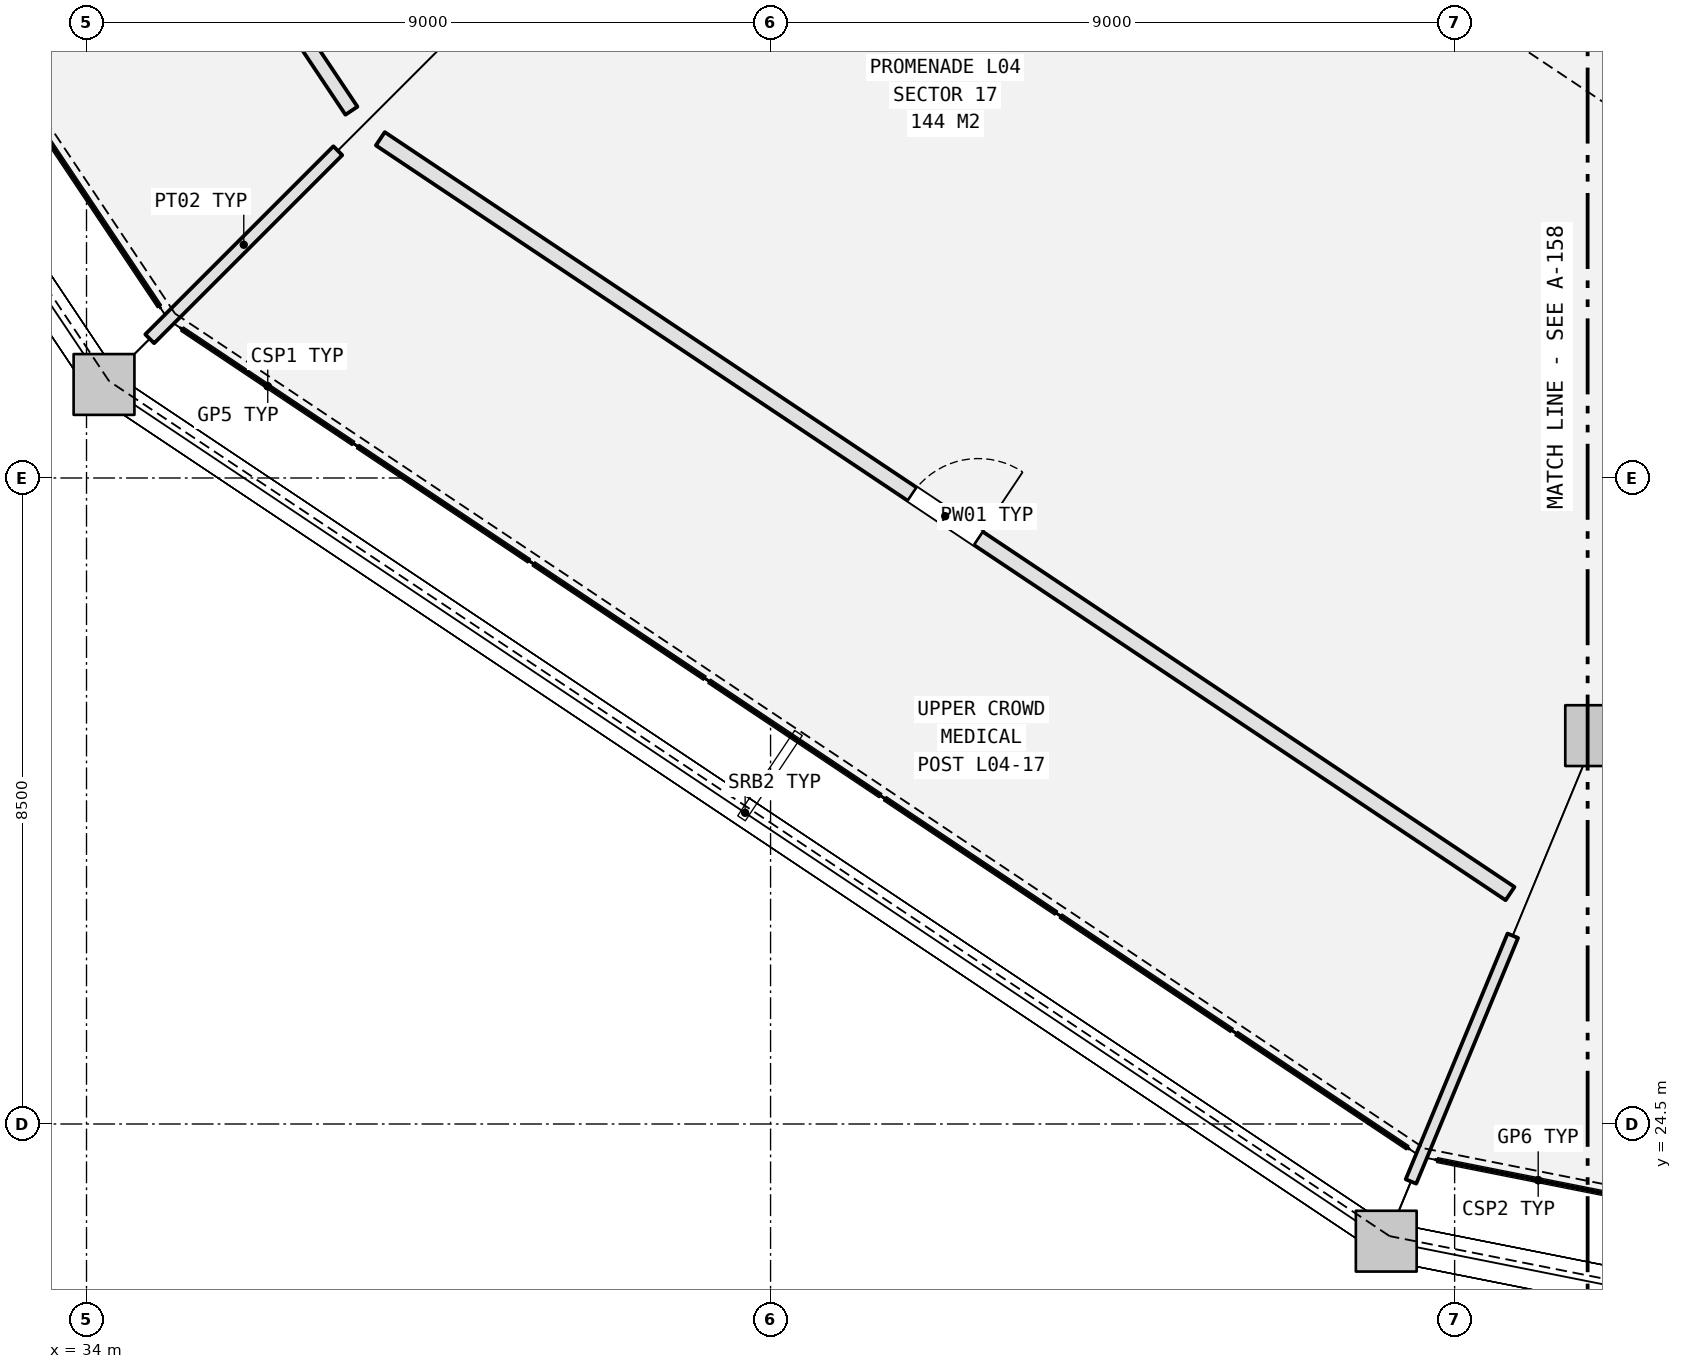
"""IFC4 building model, lengths in metres.
Left out: names, types, materials, properties, quantities, classifications, styles, units other than length and angle.
Written with IfcOpenShell. Run it as: python <this file> out.ifc"""

import sys

from ifc_helpers import new_model, si_unit, direction, frame, frame_2d, origin, origin_2d, place, context, subcontext, project, spatial, rectangle, extrude, element, fill, save


model = new_model("IFC4")
c1 = context("Model", 3, precision=1e-05, world=origin(), true_north=direction((0.0, 1.0)))
c2 = subcontext(c1, "Body", "Model", "MODEL_VIEW")
j1 = project(units=[si_unit("LENGTHUNIT", "METRE"), si_unit("PLANEANGLEUNIT", "RADIAN")], contexts=[c1])
p1 = place(None, origin())
s1 = spatial("IfcSite", under=j1, at=p1, CompositionType="ELEMENT")
p2 = place(p1, origin())
s2 = spatial("IfcBuilding", under=s1, at=p2, CompositionType="ELEMENT")
p3 = place(p2, frame((0.0, 0.0, 21.6)))
s3 = spatial("IfcBuildingStorey", under=s2, at=p3, CompositionType="ELEMENT", Elevation=21.6)
for number, where, z_axis, x_axis in (
    (1, (34.23, 34.23, 0.0), (0.0, 0.0, 1.0), (1.0, 0.0, 0.0)),
    (2, (53.856, 29.61, 0.0), (0.0, 0.0, 1.0), (1.0, 0.0, 0.0)),
    (3, (51.1, 22.958, 0.0), (0.0, 0.0, 1.0), (1.0, 0.0, 0.0)),
):
    element("IfcColumn", number, at=place(p3, frame(where, z_axis=z_axis, x_axis=x_axis)), inside=s3, PredefinedType="COLUMN", context=c2, shape_type="SweptSolid", body=[
        extrude(rectangle(XDim=0.8, YDim=0.8, at=origin_2d()), origin(), (0.0, 0.0, 1.0), 5.4),
    ])
p4 = place(p3, frame((27.554, 52.696, 0.0), z_axis=(0.0, 0.0, 1.0), x_axis=(0.55556974362, -0.831469939309, 0.0)))
e4 = element("IfcWall", 4, at=p4, inside=s3, PredefinedType="PARTITIONING", context=c2, shape_type="SweptSolid", body=[
    extrude(rectangle(XDim=17.876, YDim=0.19, at=frame_2d((8.938, 0.0))), origin(), (0.0, 0.0, 1.0), 2.772),
])
p5 = place(p4, frame((8.463, 0.0, 0.0)))
e5 = element("IfcOpeningElement", 5, at=p5, cuts=e4, PredefinedType="OPENING", context=c2, shape_type="SweptSolid", body=[
    extrude(rectangle(XDim=0.95, YDim=2.15, at=frame_2d((0.475, 1.075))), frame((0.0, 0.105, 0.0), z_axis=(0.0, -1.0, 0.0), x_axis=(1.0, 0.0, 0.0)), (0.0, 0.0, 1.0), 0.21),
])
p6 = place(p3, frame((37.306, 37.306, 0.0), z_axis=(0.0, 0.0, 1.0), x_axis=(-0.707106781187, -0.707106781187, 0.0)))
e6 = element("IfcWall", 6, at=p6, inside=s3, PredefinedType="PARTITIONING", context=c2, shape_type="SweptSolid", body=[
    extrude(rectangle(XDim=3.5, YDim=0.165, at=frame_2d((1.75, 0.0))), origin(), (0.0, 0.0, 1.0), 2.772),
])
p7 = place(p3, frame((37.866, 37.463, 0.0), z_axis=(0.0, 0.0, 1.0), x_axis=(0.831469939309, -0.55556974362, 0.0)))
e7 = element("IfcWall", 7, at=p7, inside=s3, PredefinedType="PLUMBINGWALL", context=c2, shape_type="SweptSolid", body=[
    extrude(rectangle(XDim=17.876, YDim=0.21, at=frame_2d((8.938, 0.0))), origin(), (0.0, 0.0, 1.0), 2.772),
])
p8 = place(p7, frame((8.413, 0.0, 0.0)))
e8 = element("IfcOpeningElement", 8, at=p8, cuts=e7, PredefinedType="OPENING", context=c2, shape_type="SweptSolid", body=[
    extrude(rectangle(XDim=1.05, YDim=2.2, at=frame_2d((0.525, 1.1))), frame((0.0, 0.115, 0.0), z_axis=(0.0, -1.0, 0.0), x_axis=(1.0, 0.0, 0.0)), (0.0, 0.0, 1.0), 0.23),
])
p9 = place(p3, frame((52.765, 26.977, 0.0), z_axis=(0.0, 0.0, 1.0), x_axis=(-0.382643374349, -0.923896124067, 0.0)))
e9 = element("IfcWall", 9, at=p9, inside=s3, PredefinedType="PARTITIONING", context=c2, shape_type="SweptSolid", body=[
    extrude(rectangle(XDim=3.5, YDim=0.15, at=frame_2d((1.75, 0.0))), origin(), (0.0, 0.0, 1.0), 2.772),
])
p10 = place(p8, origin())
e10 = element("IfcDoor", 10, at=p10, inside=s3, OperationType="SINGLE_SWING_RIGHT", PredefinedType="DOOR", context=c2, shape_type="SweptSolid", body=[
    extrude(rectangle(XDim=1.05, YDim=2.2, at=frame_2d((0.525, 1.1))), frame((0.0, 0.025, 0.0), z_axis=(0.0, -1.0, 0.0), x_axis=(1.0, 0.0, 0.0)), (0.0, 0.0, 1.0), 0.05),
])
fill(e8, e10)
save(model, sys.argv[1])
